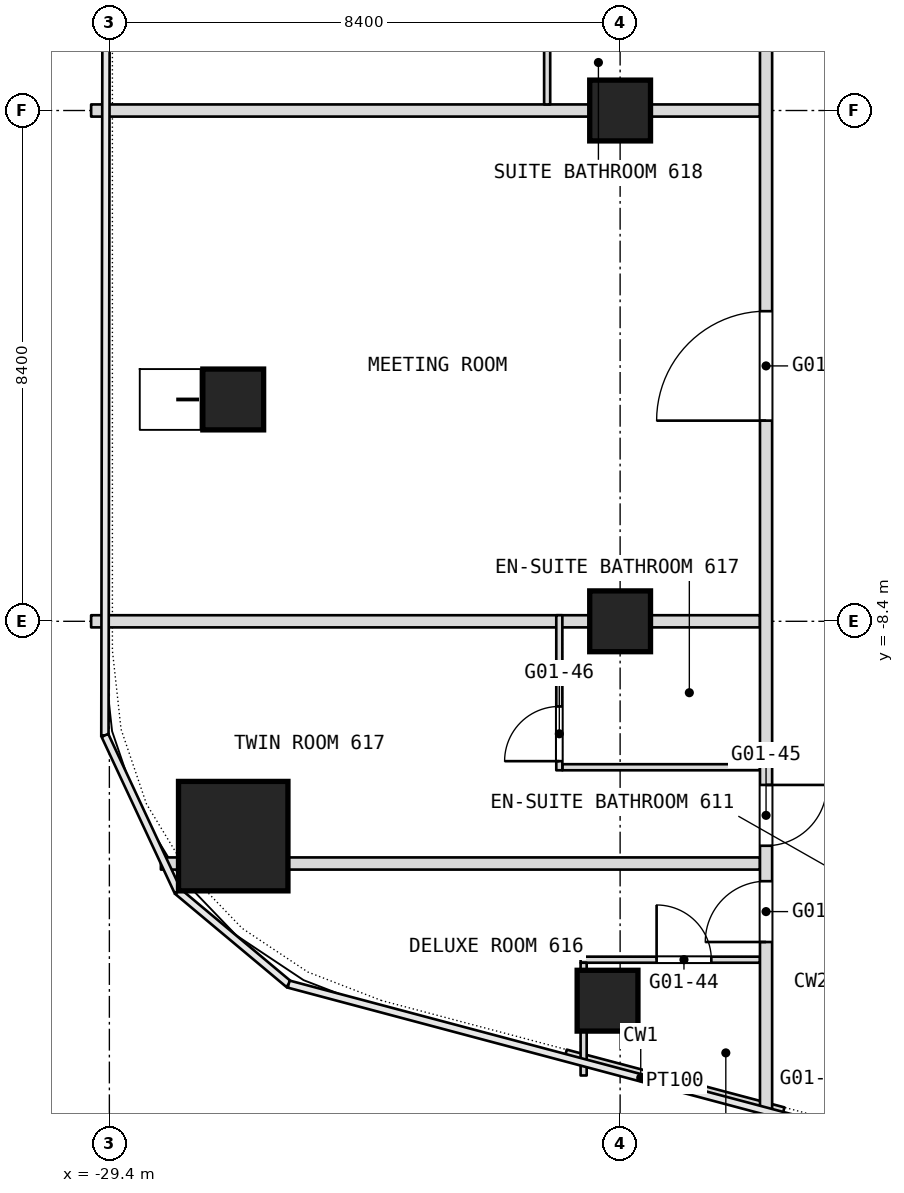
"""IFC4 building model, lengths in metres.
Left out: names, types, materials, properties, quantities, classifications, styles, units other than length and angle.
Written with IfcOpenShell. Run it as: python <this file> out.ifc"""

import sys

from ifc_helpers import new_model, si_unit, direction, frame, frame_2d, origin, origin_2d, place, context, subcontext, project, spatial, rectangle, extrude, element, fill, save


model = new_model("IFC4")
c1 = context("Model", 3, precision=1e-05, world=origin(), true_north=direction((0.0, 1.0)))
c2 = subcontext(c1, "Body", "Model", "MODEL_VIEW")
j1 = project(units=[si_unit("LENGTHUNIT", "METRE"), si_unit("PLANEANGLEUNIT", "RADIAN")], contexts=[c1])
p1 = place(None, origin())
s1 = spatial("IfcSite", under=j1, at=p1, CompositionType="ELEMENT")
p2 = place(p1, origin())
s2 = spatial("IfcBuilding", under=s1, at=p2, CompositionType="ELEMENT")
p3 = place(p2, frame((0.0, 0.0, 36.5)))
s3 = spatial("IfcBuildingStorey", under=s2, at=p3, CompositionType="ELEMENT", Elevation=36.5)
p4 = place(p3, frame((-27.363, -11.933, -0.15), z_axis=(0.0, 0.0, 1.0), x_axis=(1.0, 0.0, 0.0)))
e1 = element("IfcColumn", 1, at=p4, inside=s3, PredefinedType="COLUMN", context=c2, shape_type="SweptSolid", body=[
    extrude(rectangle(XDim=1.8, YDim=1.8, at=origin_2d()), origin(), (0.0, 0.0, 1.0), 3.75),
])
p5 = place(p3, frame((-21.0, -8.4, -0.15), z_axis=(0.0, 0.0, 1.0), x_axis=(1.0, 0.0, 0.0)))
e2 = element("IfcColumn", 2, at=p5, inside=s3, PredefinedType="COLUMN", context=c2, shape_type="SweptSolid", body=[
    extrude(rectangle(XDim=1.0, YDim=1.0, at=origin_2d()), origin(), (0.0, 0.0, 1.0), 3.75),
])
p6 = place(p3, frame((-21.0, 0.0, 0.0), z_axis=(0.0, 0.0, 1.0), x_axis=(1.0, 0.0, 0.0)))
e3 = element("IfcColumn", 3, at=p6, inside=s3, PredefinedType="COLUMN", context=c2, shape_type="SweptSolid", body=[
    extrude(rectangle(XDim=1.0, YDim=1.0, at=origin_2d()), origin(), (0.0, 0.0, 1.0), 3.6),
])
p7 = place(p3, frame((-21.207, -14.639, -0.15), z_axis=(0.0, 0.0, 1.0), x_axis=(1.0, 0.0, 0.0)))
e4 = element("IfcColumn", 4, at=p7, inside=s3, PredefinedType="COLUMN", context=c2, shape_type="SweptSolid", body=[
    extrude(rectangle(XDim=1.0, YDim=1.0, at=origin_2d()), origin(), (0.0, 0.0, 1.0), 3.75),
])
p8 = place(p3, frame((-21.89, -15.492, 0.0), z_axis=(0.0, 0.0, 1.0), x_axis=(0.966548219163, -0.256484970385, 0.0)))
e5 = element("IfcWall", 5, at=p8, inside=s3, PredefinedType="PARTITIONING", context=c2, shape_type="SweptSolid", body=[
    extrude(rectangle(XDim=3.704, YDim=0.1, at=frame_2d((1.852, 0.0))), origin(), (0.0, 0.0, 1.0), 3.34),
])
p9 = place(p3, frame((-21.65, -13.965, 0.0), z_axis=(0.0, 0.0, 1.0), x_axis=(1.0, 0.0, 0.0)))
e6 = element("IfcWall", 6, at=p9, inside=s3, PredefinedType="PARTITIONING", context=c2, shape_type="SweptSolid", body=[
    extrude(rectangle(XDim=2.95, YDim=0.1, at=frame_2d((1.475, 0.0))), origin(), (0.0, 0.0, 1.0), 3.34),
])
p10 = place(p9, frame((1.25, 0.0, 0.0)))
e7 = element("IfcOpeningElement", 7, at=p10, cuts=e6, PredefinedType="OPENING", context=c2, shape_type="SweptSolid", body=[
    extrude(rectangle(XDim=0.9, YDim=2.1, at=frame_2d((0.45, 1.05))), frame((0.0, 0.05, 0.0), z_axis=(0.0, -1.0, 0.0), x_axis=(1.0, 0.0, 0.0)), (0.0, 0.0, 1.0), 0.1),
])
p11 = place(p3, frame((-28.553, -12.383, 0.0), z_axis=(0.0, 0.0, 1.0), x_axis=(1.0, 0.0, 0.0)))
e8 = element("IfcWall", 8, at=p11, inside=s3, PredefinedType="PARTITIONING", context=c2, shape_type="SweptSolid", body=[
    extrude(rectangle(XDim=0.29, YDim=0.2, at=frame_2d((0.145, 0.0))), origin(), (0.0, 0.0, 1.0), 3.34),
])
p12 = place(p3, frame((-26.463, -12.383, 0.0), z_axis=(0.0, 0.0, 1.0), x_axis=(1.0, 0.0, 0.0)))
e9 = element("IfcWall", 9, at=p12, inside=s3, PredefinedType="PARTITIONING", context=c2, shape_type="SweptSolid", body=[
    extrude(rectangle(XDim=7.763, YDim=0.2, at=frame_2d((3.881, 0.0))), origin(), (0.0, 0.0, 1.0), 3.34),
])
p13 = place(p3, frame((-21.95, -10.8, 0.0), z_axis=(0.0, 0.0, 1.0), x_axis=(1.0, 0.0, 0.0)))
e10 = element("IfcWall", 10, at=p13, inside=s3, PredefinedType="PARTITIONING", context=c2, shape_type="SweptSolid", body=[
    extrude(rectangle(XDim=3.25, YDim=0.1, at=frame_2d((1.625, 0.0))), origin(), (0.0, 0.0, 1.0), 3.34),
])
for number, where, z_axis, x_axis in (
    (11, (-29.7, -8.4, 0.0), (0.0, 0.0, 1.0), (1.0, 0.0, 0.0)),
    (12, (-29.7, 0.0, 0.0), (0.0, 0.0, 1.0), (1.0, 0.0, 0.0)),
):
    element("IfcWall", number, at=place(p3, frame(where, z_axis=z_axis, x_axis=x_axis)), inside=s3, PredefinedType="PARTITIONING", context=c2, shape_type="SweptSolid", body=[
        extrude(rectangle(XDim=11.0, YDim=0.2, at=frame_2d((5.5, 0.0))), origin(), (0.0, 0.0, 1.0), 2.84),
    ])
p14 = place(p3, frame((-18.6, -16.665, 0.0), z_axis=(0.0, 0.0, 1.0), x_axis=(0.0, 1.0, 0.0)))
e13 = element("IfcWall", 13, at=p14, inside=s3, PredefinedType="PARTITIONING", context=c2, shape_type="SweptSolid", body=[
    extrude(rectangle(XDim=23.565, YDim=0.2, at=frame_2d((11.782, 0.0))), origin(), (0.0, 0.0, 1.0), 3.34),
])
p15 = place(p14, frame((2.991, 0.0, 0.0)))
e14 = element("IfcOpeningElement", 14, at=p15, cuts=e13, PredefinedType="OPENING", context=c2, shape_type="SweptSolid", body=[
    extrude(rectangle(XDim=1.0, YDim=2.1, at=frame_2d((0.5, 1.05))), frame((0.0, 0.1, 0.0), z_axis=(0.0, -1.0, 0.0), x_axis=(1.0, 0.0, 0.0)), (0.0, 0.0, 1.0), 0.2),
])
p16 = place(p14, frame((4.574, 0.0, 0.0)))
e15 = element("IfcOpeningElement", 15, at=p16, cuts=e13, PredefinedType="OPENING", context=c2, shape_type="SweptSolid", body=[
    extrude(rectangle(XDim=1.0, YDim=2.1, at=frame_2d((0.5, 1.05))), frame((0.0, 0.1, 0.0), z_axis=(0.0, -1.0, 0.0), x_axis=(1.0, 0.0, 0.0)), (0.0, 0.0, 1.0), 0.2),
])
p17 = place(p14, frame((11.565, 0.0, 0.0)))
e16 = element("IfcOpeningElement", 16, at=p17, cuts=e13, PredefinedType="OPENING", context=c2, shape_type="SweptSolid", body=[
    extrude(rectangle(XDim=1.8, YDim=2.1, at=frame_2d((0.9, 1.05))), frame((0.0, 0.1, 0.0), z_axis=(0.0, -1.0, 0.0), x_axis=(1.0, 0.0, 0.0)), (0.0, 0.0, 1.0), 0.2),
])
p18 = place(p3, frame((-21.6, -15.869, 0.0), z_axis=(0.0, 0.0, 1.0), x_axis=(0.0, 1.0, 0.0)))
e17 = element("IfcWall", 17, at=p18, inside=s3, PredefinedType="PARTITIONING", context=c2, shape_type="SweptSolid", body=[
    extrude(rectangle(XDim=1.854, YDim=0.1, at=frame_2d((0.927, 0.0))), origin(), (0.0, 0.0, 1.0), 3.34),
])
p19 = place(p3, frame((-22.0, -10.85, 0.0), z_axis=(0.0, 0.0, 1.0), x_axis=(0.0, 1.0, 0.0)))
e18 = element("IfcWall", 18, at=p19, inside=s3, PredefinedType="PARTITIONING", context=c2, shape_type="SweptSolid", body=[
    extrude(rectangle(XDim=2.55, YDim=0.1, at=frame_2d((1.275, 0.0))), origin(), (0.0, 0.0, 1.0), 3.34),
])
p20 = place(p19, frame((0.15, 0.0, 0.0)))
e19 = element("IfcOpeningElement", 19, at=p20, cuts=e18, PredefinedType="OPENING", context=c2, shape_type="SweptSolid", body=[
    extrude(rectangle(XDim=0.9, YDim=2.1, at=frame_2d((0.45, 1.05))), frame((0.0, 0.05, 0.0), z_axis=(0.0, -1.0, 0.0), x_axis=(1.0, 0.0, 0.0)), (0.0, 0.0, 1.0), 0.1),
])
p21 = place(p3, frame((-22.2, 0.1, 0.0), z_axis=(0.0, 0.0, 1.0), x_axis=(0.0, 1.0, 0.0)))
e20 = element("IfcWall", 20, at=p21, inside=s3, PredefinedType="PARTITIONING", context=c2, shape_type="SweptSolid", body=[
    extrude(rectangle(XDim=2.25, YDim=0.1, at=frame_2d((1.125, 0.0))), origin(), (0.0, 0.0, 1.0), 3.34),
])
p22 = place(p10, origin())
e21 = element("IfcDoor", 21, at=p22, inside=s3, OperationType="SINGLE_SWING_RIGHT", PredefinedType="DOOR", context=c2, shape_type="SweptSolid", body=[
    extrude(rectangle(XDim=0.9, YDim=2.1, at=frame_2d((0.45, 1.05))), frame((0.0, 0.025, 0.0), z_axis=(0.0, -1.0, 0.0), x_axis=(1.0, 0.0, 0.0)), (0.0, 0.0, 1.0), 0.05),
])
fill(e7, e21)
p23 = place(p15, origin())
e22 = element("IfcDoor", 22, at=p23, inside=s3, OperationType="SINGLE_SWING_RIGHT", PredefinedType="DOOR", context=c2, shape_type="SweptSolid", body=[
    extrude(rectangle(XDim=1.0, YDim=2.1, at=frame_2d((0.5, 1.05))), frame((0.0, 0.025, 0.0), z_axis=(0.0, -1.0, 0.0), x_axis=(1.0, 0.0, 0.0)), (0.0, 0.0, 1.0), 0.05),
])
fill(e14, e22)
p24 = place(p16, origin())
e23 = element("IfcDoor", 23, at=p24, inside=s3, OperationType="SINGLE_SWING_RIGHT", PredefinedType="DOOR", context=c2, shape_type="SweptSolid", body=[
    extrude(rectangle(XDim=1.0, YDim=2.1, at=frame_2d((0.5, 1.05))), frame((0.0, 0.025, 0.0), z_axis=(0.0, -1.0, 0.0), x_axis=(1.0, 0.0, 0.0)), (0.0, 0.0, 1.0), 0.05),
])
fill(e15, e23)
p25 = place(p17, origin())
e24 = element("IfcDoor", 24, at=p25, inside=s3, OperationType="DOUBLE_DOOR_SINGLE_SWING", PredefinedType="DOOR", context=c2, shape_type="SweptSolid", body=[
    extrude(rectangle(XDim=1.8, YDim=2.1, at=frame_2d((0.9, 1.05))), frame((0.0, 0.025, 0.0), z_axis=(0.0, -1.0, 0.0), x_axis=(1.0, 0.0, 0.0)), (0.0, 0.0, 1.0), 0.05),
])
fill(e16, e24)
p26 = place(p20, origin())
e25 = element("IfcDoor", 25, at=p26, inside=s3, OperationType="SINGLE_SWING_RIGHT", PredefinedType="DOOR", context=c2, shape_type="SweptSolid", body=[
    extrude(rectangle(XDim=0.9, YDim=2.1, at=frame_2d((0.45, 1.05))), frame((0.0, 0.025, 0.0), z_axis=(0.0, -1.0, 0.0), x_axis=(1.0, 0.0, 0.0)), (0.0, 0.0, 1.0), 0.05),
])
fill(e19, e25)
save(model, sys.argv[1])
